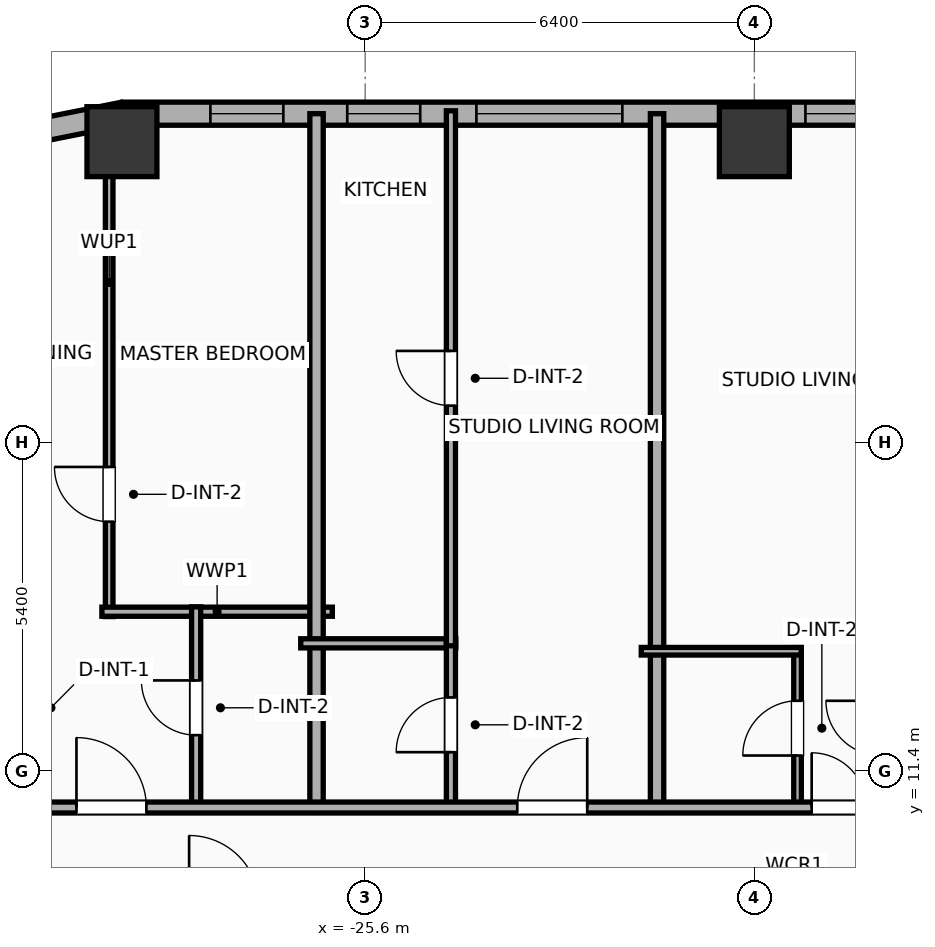
"""IFC4 building model, lengths in metres.
Left out: names, types, materials, properties, quantities, classifications, styles, units other than length and angle.
Written with IfcOpenShell. Run it as: python <this file> out.ifc"""

import sys

from ifc_helpers import new_model, si_unit, direction, frame, frame_2d, origin, origin_2d, place, context, subcontext, project, spatial, rectangle, hollow_rectangle, extrude, element, fill, save


model = new_model("IFC4")
c1 = context("Model", 3, precision=1e-05, world=origin(), true_north=direction((0.0, 1.0)))
c2 = subcontext(c1, "Body", "Model", "MODEL_VIEW")
j1 = project(units=[si_unit("LENGTHUNIT", "METRE"), si_unit("PLANEANGLEUNIT", "RADIAN")], contexts=[c1])
p1 = place(None, origin())
s1 = spatial("IfcSite", under=j1, at=p1, CompositionType="ELEMENT")
p2 = place(p1, origin())
s2 = spatial("IfcBuilding", under=s1, at=p2, CompositionType="ELEMENT")
p3 = place(p2, frame((0.0, 0.0, 29.9)))
s3 = spatial("IfcBuildingStorey", under=s2, at=p3, CompositionType="ELEMENT", Elevation=29.9)
for number, where, z_axis, x_axis in (
    (1, (-19.2, 21.75, 0.0), (0.0, 0.0, 1.0), (1.0, 0.0, 0.0)),
    (2, (-29.6, 21.75, 0.0), (0.0, 0.0, 1.0), (1.0, 0.0, 0.0)),
):
    element("IfcColumn", number, at=place(p3, frame(where, z_axis=z_axis, x_axis=x_axis)), inside=s3, PredefinedType="COLUMN", context=c2, shape_type="SweptSolid", body=[
        extrude(hollow_rectangle(XDim=1.15, YDim=1.15, WallThickness=0.04, at=origin_2d()), origin(), (0.0, 0.0, 1.0), 3.9),
    ])
p4 = place(p3, frame((-31.057, 21.917, 0.0), z_axis=(0.0, 0.0, 1.0), x_axis=(0.980786132421, 0.195086038585, 0.0)))
e3 = element("IfcWall", 3, at=p4, inside=s3, PredefinedType="ELEMENTEDWALL", context=c2, shape_type="SweptSolid", body=[
    extrude(rectangle(XDim=1.504, YDim=0.38, at=frame_2d((0.752, 0.0))), origin(), (0.0, 0.0, 1.0), 2.54),
])
p5 = place(p3, frame((-29.581, 22.21, 0.0), z_axis=(0.0, 0.0, 1.0), x_axis=(1.0, 0.0, 0.0)))
e4 = element("IfcWall", 4, at=p5, inside=s3, PredefinedType="ELEMENTEDWALL", context=c2, shape_type="SweptSolid", body=[
    extrude(rectangle(XDim=51.963, YDim=0.38, at=frame_2d((25.981, 0.0))), origin(), (0.0, 0.0, 1.0), 2.54),
])
p6 = place(p5, frame((5.81, 0.0, 0.75)))
e5 = element("IfcOpeningElement", 5, at=p6, cuts=e4, PredefinedType="OPENING", context=c2, shape_type="SweptSolid", body=[
    extrude(rectangle(XDim=2.4, YDim=1.63, at=frame_2d((1.2, 0.815))), frame((0.0, 0.2, 0.0), z_axis=(0.0, -1.0, 0.0), x_axis=(1.0, 0.0, 0.0)), (0.0, 0.0, 1.0), 0.4),
])
p7 = place(p5, frame((42.952, 0.0, 0.75)))
e6 = element("IfcOpeningElement", 6, at=p7, cuts=e4, PredefinedType="OPENING", context=c2, shape_type="SweptSolid", body=[
    extrude(rectangle(XDim=2.4, YDim=1.63, at=frame_2d((1.2, 0.815))), frame((0.0, 0.2, 0.0), z_axis=(0.0, -1.0, 0.0), x_axis=(1.0, 0.0, 0.0)), (0.0, 0.0, 1.0), 0.4),
])
p8 = place(p5, frame((1.436, 0.0, 0.75)))
e7 = element("IfcOpeningElement", 7, at=p8, cuts=e4, PredefinedType="OPENING", context=c2, shape_type="SweptSolid", body=[
    extrude(rectangle(XDim=1.2, YDim=1.63, at=frame_2d((0.6, 0.815))), frame((0.0, 0.2, 0.0), z_axis=(0.0, -1.0, 0.0), x_axis=(1.0, 0.0, 0.0)), (0.0, 0.0, 1.0), 0.4),
])
p9 = place(p5, frame((3.686, 0.0, 0.75)))
e8 = element("IfcOpeningElement", 8, at=p9, cuts=e4, PredefinedType="OPENING", context=c2, shape_type="SweptSolid", body=[
    extrude(rectangle(XDim=1.2, YDim=1.63, at=frame_2d((0.6, 0.815))), frame((0.0, 0.2, 0.0), z_axis=(0.0, -1.0, 0.0), x_axis=(1.0, 0.0, 0.0)), (0.0, 0.0, 1.0), 0.4),
])
p10 = place(p5, frame((11.221, 0.0, 0.75)))
e9 = element("IfcOpeningElement", 9, at=p10, cuts=e4, PredefinedType="OPENING", context=c2, shape_type="SweptSolid", body=[
    extrude(rectangle(XDim=1.2, YDim=1.63, at=frame_2d((0.6, 0.815))), frame((0.0, 0.2, 0.0), z_axis=(0.0, -1.0, 0.0), x_axis=(1.0, 0.0, 0.0)), (0.0, 0.0, 1.0), 0.4),
])
p11 = place(p5, frame((17.686, 0.0, 0.75)))
e10 = element("IfcOpeningElement", 10, at=p11, cuts=e4, PredefinedType="OPENING", context=c2, shape_type="SweptSolid", body=[
    extrude(rectangle(XDim=1.2, YDim=1.63, at=frame_2d((0.6, 0.815))), frame((0.0, 0.2, 0.0), z_axis=(0.0, -1.0, 0.0), x_axis=(1.0, 0.0, 0.0)), (0.0, 0.0, 1.0), 0.4),
])
p12 = place(p5, frame((14.886, 0.0, 0.75)))
e11 = element("IfcOpeningElement", 11, at=p12, cuts=e4, PredefinedType="OPENING", context=c2, shape_type="SweptSolid", body=[
    extrude(rectangle(XDim=1.2, YDim=1.63, at=frame_2d((0.6, 0.815))), frame((0.0, 0.2, 0.0), z_axis=(0.0, -1.0, 0.0), x_axis=(1.0, 0.0, 0.0)), (0.0, 0.0, 1.0), 0.4),
])
p13 = place(p5, frame((22.181, 0.0, 0.75)))
e12 = element("IfcOpeningElement", 12, at=p13, cuts=e4, PredefinedType="OPENING", context=c2, shape_type="SweptSolid", body=[
    extrude(rectangle(XDim=1.2, YDim=1.63, at=frame_2d((0.6, 0.815))), frame((0.0, 0.2, 0.0), z_axis=(0.0, -1.0, 0.0), x_axis=(1.0, 0.0, 0.0)), (0.0, 0.0, 1.0), 0.4),
])
p14 = place(p5, frame((28.926, 0.0, 0.75)))
e13 = element("IfcOpeningElement", 13, at=p14, cuts=e4, PredefinedType="OPENING", context=c2, shape_type="SweptSolid", body=[
    extrude(rectangle(XDim=1.2, YDim=1.63, at=frame_2d((0.6, 0.815))), frame((0.0, 0.2, 0.0), z_axis=(0.0, -1.0, 0.0), x_axis=(1.0, 0.0, 0.0)), (0.0, 0.0, 1.0), 0.4),
])
p15 = place(p5, frame((26.126, 0.0, 0.75)))
e14 = element("IfcOpeningElement", 14, at=p15, cuts=e4, PredefinedType="OPENING", context=c2, shape_type="SweptSolid", body=[
    extrude(rectangle(XDim=1.2, YDim=1.63, at=frame_2d((0.6, 0.815))), frame((0.0, 0.2, 0.0), z_axis=(0.0, -1.0, 0.0), x_axis=(1.0, 0.0, 0.0)), (0.0, 0.0, 1.0), 0.4),
])
p16 = place(p5, frame((32.276, 0.0, 0.75)))
e15 = element("IfcOpeningElement", 15, at=p16, cuts=e4, PredefinedType="OPENING", context=c2, shape_type="SweptSolid", body=[
    extrude(rectangle(XDim=1.2, YDim=1.63, at=frame_2d((0.6, 0.815))), frame((0.0, 0.2, 0.0), z_axis=(0.0, -1.0, 0.0), x_axis=(1.0, 0.0, 0.0)), (0.0, 0.0, 1.0), 0.4),
])
p17 = place(p5, frame((35.076, 0.0, 0.75)))
e16 = element("IfcOpeningElement", 16, at=p17, cuts=e4, PredefinedType="OPENING", context=c2, shape_type="SweptSolid", body=[
    extrude(rectangle(XDim=1.2, YDim=1.63, at=frame_2d((0.6, 0.815))), frame((0.0, 0.2, 0.0), z_axis=(0.0, -1.0, 0.0), x_axis=(1.0, 0.0, 0.0)), (0.0, 0.0, 1.0), 0.4),
])
p18 = place(p5, frame((38.981, 0.0, 0.75)))
e17 = element("IfcOpeningElement", 17, at=p18, cuts=e4, PredefinedType="OPENING", context=c2, shape_type="SweptSolid", body=[
    extrude(rectangle(XDim=1.2, YDim=1.63, at=frame_2d((0.6, 0.815))), frame((0.0, 0.2, 0.0), z_axis=(0.0, -1.0, 0.0), x_axis=(1.0, 0.0, 0.0)), (0.0, 0.0, 1.0), 0.4),
])
p19 = place(p5, frame((46.276, 0.0, 0.75)))
e18 = element("IfcOpeningElement", 18, at=p19, cuts=e4, PredefinedType="OPENING", context=c2, shape_type="SweptSolid", body=[
    extrude(rectangle(XDim=1.2, YDim=1.63, at=frame_2d((0.6, 0.815))), frame((0.0, 0.2, 0.0), z_axis=(0.0, -1.0, 0.0), x_axis=(1.0, 0.0, 0.0)), (0.0, 0.0, 1.0), 0.4),
])
p20 = place(p5, frame((48.927, 0.0, 0.75)))
e19 = element("IfcOpeningElement", 19, at=p20, cuts=e4, PredefinedType="OPENING", context=c2, shape_type="SweptSolid", body=[
    extrude(rectangle(XDim=1.2, YDim=1.63, at=frame_2d((0.6, 0.815))), frame((0.0, 0.2, 0.0), z_axis=(0.0, -1.0, 0.0), x_axis=(1.0, 0.0, 0.0)), (0.0, 0.0, 1.0), 0.4),
])
p21 = place(p3, frame((-29.81, 13.94, 0.0), z_axis=(0.0, 0.0, 1.0), x_axis=(0.0, 1.0, 0.0)))
e20 = element("IfcWall", 20, at=p21, inside=s3, PredefinedType="PARTITIONING", context=c2, shape_type="SweptSolid", body=[
    extrude(rectangle(XDim=8.377, YDim=0.125, at=frame_2d((4.189, 0.0))), origin(), (0.0, 0.0, 1.0), 3.65),
])
p22 = place(p21, frame((1.561, 0.0, 0.0)))
e21 = element("IfcOpeningElement", 21, at=p22, cuts=e20, PredefinedType="OPENING", context=c2, shape_type="SweptSolid", body=[
    extrude(rectangle(XDim=0.9, YDim=2.05, at=frame_2d((0.45, 1.025))), frame((0.0, 0.073, 0.0), z_axis=(0.0, -1.0, 0.0), x_axis=(1.0, 0.0, 0.0)), (0.0, 0.0, 1.0), 0.145),
])
p23 = place(p3, frame((-29.93, 14.02, 0.0), z_axis=(0.0, 0.0, 1.0), x_axis=(1.0, 0.0, 0.0)))
e22 = element("IfcWall", 22, at=p23, inside=s3, PredefinedType="PLUMBINGWALL", context=c2, shape_type="SweptSolid", body=[
    extrude(rectangle(XDim=3.79, YDim=0.15, at=frame_2d((1.895, 0.0))), origin(), (0.0, 0.0, 1.0), 3.65),
])
p24 = place(p3, frame((-28.38, 10.78, 0.0), z_axis=(0.0, 0.0, 1.0), x_axis=(0.0, 1.0, 0.0)))
e23 = element("IfcWall", 23, at=p24, inside=s3, PredefinedType="PLUMBINGWALL", context=c2, shape_type="SweptSolid", body=[
    extrude(rectangle(XDim=3.32, YDim=0.15, at=frame_2d((1.66, 0.0))), origin(), (0.0, 0.0, 1.0), 3.65),
])
p25 = place(p24, frame((1.21, 0.0, 0.0)))
e24 = element("IfcOpeningElement", 24, at=p25, cuts=e23, PredefinedType="OPENING", context=c2, shape_type="SweptSolid", body=[
    extrude(rectangle(XDim=0.9, YDim=2.05, at=frame_2d((0.45, 1.025))), frame((0.0, 0.085, 0.0), z_axis=(0.0, -1.0, 0.0), x_axis=(1.0, 0.0, 0.0)), (0.0, 0.0, 1.0), 0.17),
])
p26 = place(p3, frame((-26.4, 10.72, 0.0), z_axis=(0.0, 0.0, 1.0), x_axis=(0.0, 1.0, 0.0)))
e25 = element("IfcWall", 25, at=p26, inside=s3, PredefinedType="PARTITIONING", context=c2, shape_type="SweptSolid", body=[
    extrude(rectangle(XDim=11.49, YDim=0.22, at=frame_2d((5.745, 0.0))), origin(), (0.0, 0.0, 1.0), 3.65),
])
p27 = place(p3, frame((-26.66, 13.5, 0.0), z_axis=(0.0, 0.0, 1.0), x_axis=(1.0, 0.0, 0.0)))
e26 = element("IfcWall", 26, at=p27, inside=s3, PredefinedType="PLUMBINGWALL", context=c2, shape_type="SweptSolid", body=[
    extrude(rectangle(XDim=2.55, YDim=0.15, at=frame_2d((1.275, 0.0))), origin(), (0.0, 0.0, 1.0), 3.65),
])
p28 = place(p3, frame((-24.19, 10.78, 0.0), z_axis=(0.0, 0.0, 1.0), x_axis=(0.0, 1.0, 0.0)))
e27 = element("IfcWall", 27, at=p28, inside=s3, PredefinedType="PLUMBINGWALL", context=c2, shape_type="SweptSolid", body=[
    extrude(rectangle(XDim=2.76, YDim=0.15, at=frame_2d((1.38, 0.0))), origin(), (0.0, 0.0, 1.0), 3.65),
])
p29 = place(p28, frame((0.93, 0.0, 0.0)))
e28 = element("IfcOpeningElement", 28, at=p29, cuts=e27, PredefinedType="OPENING", context=c2, shape_type="SweptSolid", body=[
    extrude(rectangle(XDim=0.9, YDim=2.05, at=frame_2d((0.45, 1.025))), frame((0.0, 0.085, 0.0), z_axis=(0.0, -1.0, 0.0), x_axis=(1.0, 0.0, 0.0)), (0.0, 0.0, 1.0), 0.17),
])
p30 = place(p3, frame((-24.19, 13.46, 0.0), z_axis=(0.0, 0.0, 1.0), x_axis=(0.0, 1.0, 0.0)))
e29 = element("IfcWall", 29, at=p30, inside=s3, PredefinedType="PLUMBINGWALL", context=c2, shape_type="SweptSolid", body=[
    extrude(rectangle(XDim=8.798, YDim=0.15, at=frame_2d((4.399, 0.0))), origin(), (0.0, 0.0, 1.0), 3.65),
])
p31 = place(p30, frame((3.949, 0.0, 0.0)))
e30 = element("IfcOpeningElement", 30, at=p31, cuts=e29, PredefinedType="OPENING", context=c2, shape_type="SweptSolid", body=[
    extrude(rectangle(XDim=0.9, YDim=2.05, at=frame_2d((0.45, 1.025))), frame((0.0, 0.085, 0.0), z_axis=(0.0, -1.0, 0.0), x_axis=(1.0, 0.0, 0.0)), (0.0, 0.0, 1.0), 0.17),
])
p32 = place(p3, frame((-20.8, 10.72, 0.0), z_axis=(0.0, 0.0, 1.0), x_axis=(0.0, 1.0, 0.0)))
e31 = element("IfcWall", 31, at=p32, inside=s3, PredefinedType="PARTITIONING", context=c2, shape_type="SweptSolid", body=[
    extrude(rectangle(XDim=11.49, YDim=0.22, at=frame_2d((5.745, 0.0))), origin(), (0.0, 0.0, 1.0), 3.65),
])
p33 = place(p3, frame((-18.49, 10.78, 0.0), z_axis=(0.0, 0.0, 1.0), x_axis=(0.0, 1.0, 0.0)))
e32 = element("IfcWall", 32, at=p33, inside=s3, PredefinedType="PARTITIONING", context=c2, shape_type="SweptSolid", body=[
    extrude(rectangle(XDim=2.65, YDim=0.125, at=frame_2d((1.325, 0.0))), origin(), (0.0, 0.0, 1.0), 3.65),
])
p34 = place(p33, frame((0.875, 0.0, 0.0)))
e33 = element("IfcOpeningElement", 33, at=p34, cuts=e32, PredefinedType="OPENING", context=c2, shape_type="SweptSolid", body=[
    extrude(rectangle(XDim=0.9, YDim=2.05, at=frame_2d((0.45, 1.025))), frame((0.0, 0.073, 0.0), z_axis=(0.0, -1.0, 0.0), x_axis=(1.0, 0.0, 0.0)), (0.0, 0.0, 1.0), 0.145),
])
p35 = place(p3, frame((-21.06, 13.37, 0.0), z_axis=(0.0, 0.0, 1.0), x_axis=(1.0, 0.0, 0.0)))
e34 = element("IfcWall", 34, at=p35, inside=s3, PredefinedType="PARTITIONING", context=c2, shape_type="SweptSolid", body=[
    extrude(rectangle(XDim=2.63, YDim=0.125, at=frame_2d((1.315, 0.0))), origin(), (0.0, 0.0, 1.0), 3.65),
])
p36 = place(p3, frame((-33.41, 10.8, 0.0), z_axis=(0.0, 0.0, 1.0), x_axis=(1.0, 0.0, 0.0)))
e35 = element("IfcWall", 35, at=p36, inside=s3, PredefinedType="PARTITIONING", context=c2, shape_type="SweptSolid", body=[
    extrude(rectangle(XDim=59.62, YDim=0.18, at=frame_2d((29.81, 0.0))), origin(), (0.0, 0.0, 1.0), 3.65),
])
p37 = place(p36, frame((3.062, 0.0, 0.0)))
e36 = element("IfcOpeningElement", 36, at=p37, cuts=e35, PredefinedType="OPENING", context=c2, shape_type="SweptSolid", body=[
    extrude(rectangle(XDim=1.15, YDim=2.05, at=frame_2d((0.575, 1.025))), frame((0.0, 0.1, 0.0), z_axis=(0.0, -1.0, 0.0), x_axis=(1.0, 0.0, 0.0)), (0.0, 0.0, 1.0), 0.2),
])
p38 = place(p36, frame((10.312, 0.0, 0.0)))
e37 = element("IfcOpeningElement", 37, at=p38, cuts=e35, PredefinedType="OPENING", context=c2, shape_type="SweptSolid", body=[
    extrude(rectangle(XDim=1.15, YDim=2.05, at=frame_2d((0.575, 1.025))), frame((0.0, 0.1, 0.0), z_axis=(0.0, -1.0, 0.0), x_axis=(1.0, 0.0, 0.0)), (0.0, 0.0, 1.0), 0.2),
])
p39 = place(p36, frame((15.153, 0.0, 0.0)))
e38 = element("IfcOpeningElement", 38, at=p39, cuts=e35, PredefinedType="OPENING", context=c2, shape_type="SweptSolid", body=[
    extrude(rectangle(XDim=0.9, YDim=2.05, at=frame_2d((0.45, 1.025))), frame((0.0, 0.1, 0.0), z_axis=(0.0, -1.0, 0.0), x_axis=(1.0, 0.0, 0.0)), (0.0, 0.0, 1.0), 0.2),
])
p40 = place(p36, frame((21.508, 0.0, 0.0)))
e39 = element("IfcOpeningElement", 39, at=p40, cuts=e35, PredefinedType="OPENING", context=c2, shape_type="SweptSolid", body=[
    extrude(rectangle(XDim=1.15, YDim=2.05, at=frame_2d((0.575, 1.025))), frame((0.0, 0.1, 0.0), z_axis=(0.0, -1.0, 0.0), x_axis=(1.0, 0.0, 0.0)), (0.0, 0.0, 1.0), 0.2),
])
p41 = place(p36, frame((26.355, 0.0, 0.0)))
e40 = element("IfcOpeningElement", 40, at=p41, cuts=e35, PredefinedType="OPENING", context=c2, shape_type="SweptSolid", body=[
    extrude(rectangle(XDim=0.9, YDim=2.05, at=frame_2d((0.45, 1.025))), frame((0.0, 0.1, 0.0), z_axis=(0.0, -1.0, 0.0), x_axis=(1.0, 0.0, 0.0)), (0.0, 0.0, 1.0), 0.2),
])
p42 = place(p36, frame((32.753, 0.0, 0.0)))
e41 = element("IfcOpeningElement", 41, at=p42, cuts=e35, PredefinedType="OPENING", context=c2, shape_type="SweptSolid", body=[
    extrude(rectangle(XDim=1.15, YDim=2.05, at=frame_2d((0.575, 1.025))), frame((0.0, 0.1, 0.0), z_axis=(0.0, -1.0, 0.0), x_axis=(1.0, 0.0, 0.0)), (0.0, 0.0, 1.0), 0.2),
])
p43 = place(p36, frame((36.163, 0.0, 0.0)))
e42 = element("IfcOpeningElement", 42, at=p43, cuts=e35, PredefinedType="OPENING", context=c2, shape_type="SweptSolid", body=[
    extrude(rectangle(XDim=1.15, YDim=2.05, at=frame_2d((0.575, 1.025))), frame((0.0, 0.1, 0.0), z_axis=(0.0, -1.0, 0.0), x_axis=(1.0, 0.0, 0.0)), (0.0, 0.0, 1.0), 0.2),
])
p44 = place(p36, frame((43.156, 0.0, 0.0)))
e43 = element("IfcOpeningElement", 43, at=p44, cuts=e35, PredefinedType="OPENING", context=c2, shape_type="SweptSolid", body=[
    extrude(rectangle(XDim=0.9, YDim=2.05, at=frame_2d((0.45, 1.025))), frame((0.0, 0.1, 0.0), z_axis=(0.0, -1.0, 0.0), x_axis=(1.0, 0.0, 0.0)), (0.0, 0.0, 1.0), 0.2),
])
p45 = place(p36, frame((47.36, 0.0, 0.0)))
e44 = element("IfcOpeningElement", 44, at=p45, cuts=e35, PredefinedType="OPENING", context=c2, shape_type="SweptSolid", body=[
    extrude(rectangle(XDim=1.15, YDim=2.05, at=frame_2d((0.575, 1.025))), frame((0.0, 0.1, 0.0), z_axis=(0.0, -1.0, 0.0), x_axis=(1.0, 0.0, 0.0)), (0.0, 0.0, 1.0), 0.2),
])
p46 = place(p36, frame((55.337, 0.0, 0.0)))
e45 = element("IfcOpeningElement", 45, at=p46, cuts=e35, PredefinedType="OPENING", context=c2, shape_type="SweptSolid", body=[
    extrude(rectangle(XDim=1.15, YDim=2.05, at=frame_2d((0.575, 1.025))), frame((0.0, 0.1, 0.0), z_axis=(0.0, -1.0, 0.0), x_axis=(1.0, 0.0, 0.0)), (0.0, 0.0, 1.0), 0.2),
])
p47 = place(p6, origin())
e46 = element("IfcWindow", 46, at=p47, inside=s3, PartitioningType="SINGLE_PANEL", PredefinedType="WINDOW", context=c2, shape_type="SweptSolid", body=[
    extrude(rectangle(XDim=2.4, YDim=1.63, at=frame_2d((1.2, 0.815))), frame((0.0, 0.03, 0.0), z_axis=(0.0, -1.0, 0.0), x_axis=(1.0, 0.0, 0.0)), (0.0, 0.0, 1.0), 0.06),
])
fill(e5, e46)
p48 = place(p8, origin())
e47 = element("IfcWindow", 47, at=p48, inside=s3, PartitioningType="SINGLE_PANEL", PredefinedType="WINDOW", context=c2, shape_type="SweptSolid", body=[
    extrude(rectangle(XDim=1.2, YDim=1.63, at=frame_2d((0.6, 0.815))), frame((0.0, 0.03, 0.0), z_axis=(0.0, -1.0, 0.0), x_axis=(1.0, 0.0, 0.0)), (0.0, 0.0, 1.0), 0.06),
])
fill(e7, e47)
p49 = place(p9, origin())
e48 = element("IfcWindow", 48, at=p49, inside=s3, PartitioningType="SINGLE_PANEL", PredefinedType="WINDOW", context=c2, shape_type="SweptSolid", body=[
    extrude(rectangle(XDim=1.2, YDim=1.63, at=frame_2d((0.6, 0.815))), frame((0.0, 0.03, 0.0), z_axis=(0.0, -1.0, 0.0), x_axis=(1.0, 0.0, 0.0)), (0.0, 0.0, 1.0), 0.06),
])
fill(e8, e48)
p50 = place(p10, origin())
e49 = element("IfcWindow", 49, at=p50, inside=s3, PartitioningType="SINGLE_PANEL", PredefinedType="WINDOW", context=c2, shape_type="SweptSolid", body=[
    extrude(rectangle(XDim=1.2, YDim=1.63, at=frame_2d((0.6, 0.815))), frame((0.0, 0.03, 0.0), z_axis=(0.0, -1.0, 0.0), x_axis=(1.0, 0.0, 0.0)), (0.0, 0.0, 1.0), 0.06),
])
fill(e9, e49)
p51 = place(p22, origin())
e50 = element("IfcDoor", 50, at=p51, inside=s3, OperationType="SINGLE_SWING_RIGHT", PredefinedType="DOOR", context=c2, shape_type="SweptSolid", body=[
    extrude(rectangle(XDim=0.9, YDim=2.05, at=frame_2d((0.45, 1.025))), frame((0.0, 0.025, 0.0), z_axis=(0.0, -1.0, 0.0), x_axis=(1.0, 0.0, 0.0)), (0.0, 0.0, 1.0), 0.05),
])
fill(e21, e50)
p52 = place(p25, origin())
e51 = element("IfcDoor", 51, at=p52, inside=s3, OperationType="SINGLE_SWING_RIGHT", PredefinedType="DOOR", context=c2, shape_type="SweptSolid", body=[
    extrude(rectangle(XDim=0.9, YDim=2.05, at=frame_2d((0.45, 1.025))), frame((0.0, 0.025, 0.0), z_axis=(0.0, -1.0, 0.0), x_axis=(1.0, 0.0, 0.0)), (0.0, 0.0, 1.0), 0.05),
])
fill(e24, e51)
p53 = place(p29, origin())
e52 = element("IfcDoor", 52, at=p53, inside=s3, OperationType="SINGLE_SWING_LEFT", PredefinedType="DOOR", context=c2, shape_type="SweptSolid", body=[
    extrude(rectangle(XDim=0.9, YDim=2.05, at=frame_2d((0.45, 1.025))), frame((0.0, 0.025, 0.0), z_axis=(0.0, -1.0, 0.0), x_axis=(1.0, 0.0, 0.0)), (0.0, 0.0, 1.0), 0.05),
])
fill(e28, e52)
p54 = place(p31, origin())
e53 = element("IfcDoor", 53, at=p54, inside=s3, OperationType="SINGLE_SWING_RIGHT", PredefinedType="DOOR", context=c2, shape_type="SweptSolid", body=[
    extrude(rectangle(XDim=0.9, YDim=2.05, at=frame_2d((0.45, 1.025))), frame((0.0, 0.025, 0.0), z_axis=(0.0, -1.0, 0.0), x_axis=(1.0, 0.0, 0.0)), (0.0, 0.0, 1.0), 0.05),
])
fill(e30, e53)
p55 = place(p34, origin())
e54 = element("IfcDoor", 54, at=p55, inside=s3, OperationType="SINGLE_SWING_LEFT", PredefinedType="DOOR", context=c2, shape_type="SweptSolid", body=[
    extrude(rectangle(XDim=0.9, YDim=2.05, at=frame_2d((0.45, 1.025))), frame((0.0, 0.025, 0.0), z_axis=(0.0, -1.0, 0.0), x_axis=(1.0, 0.0, 0.0)), (0.0, 0.0, 1.0), 0.05),
])
fill(e33, e54)
p56 = place(p37, origin())
e55 = element("IfcDoor", 55, at=p56, inside=s3, OperationType="SINGLE_SWING_LEFT", PredefinedType="DOOR", context=c2, shape_type="SweptSolid", body=[
    extrude(rectangle(XDim=1.15, YDim=2.05, at=frame_2d((0.575, 1.025))), frame((0.0, 0.025, 0.0), z_axis=(0.0, -1.0, 0.0), x_axis=(1.0, 0.0, 0.0)), (0.0, 0.0, 1.0), 0.05),
])
fill(e36, e55)
p57 = place(p38, origin())
e56 = element("IfcDoor", 56, at=p57, inside=s3, OperationType="SINGLE_SWING_RIGHT", PredefinedType="DOOR", context=c2, shape_type="SweptSolid", body=[
    extrude(rectangle(XDim=1.15, YDim=2.05, at=frame_2d((0.575, 1.025))), frame((0.0, 0.025, 0.0), z_axis=(0.0, -1.0, 0.0), x_axis=(1.0, 0.0, 0.0)), (0.0, 0.0, 1.0), 0.05),
])
fill(e37, e56)
p58 = place(p39, origin())
e57 = element("IfcDoor", 57, at=p58, inside=s3, OperationType="SINGLE_SWING_LEFT", PredefinedType="DOOR", context=c2, shape_type="SweptSolid", body=[
    extrude(rectangle(XDim=0.9, YDim=2.05, at=frame_2d((0.45, 1.025))), frame((0.0, 0.025, 0.0), z_axis=(0.0, -1.0, 0.0), x_axis=(1.0, 0.0, 0.0)), (0.0, 0.0, 1.0), 0.05),
])
fill(e38, e57)
save(model, sys.argv[1])
